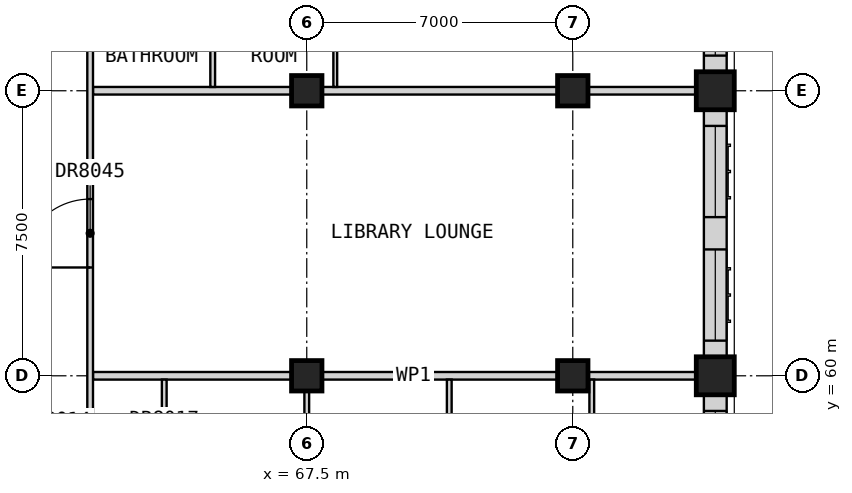
"""IFC4 building model, lengths in metres.
Left out: names, types, materials, properties, quantities, classifications, styles, units other than length and angle.
Written with IfcOpenShell. Run it as: python <this file> out.ifc"""

import sys

from ifc_helpers import new_model, si_unit, direction, frame, frame_2d, origin, origin_2d, place, context, subcontext, project, spatial, rectangle, extrude, element, fill, save


model = new_model("IFC4")
c1 = context("Model", 3, precision=1e-05, world=origin(), true_north=direction((0.0, 1.0)))
c2 = subcontext(c1, "Body", "Model", "MODEL_VIEW")
j1 = project(units=[si_unit("LENGTHUNIT", "METRE"), si_unit("PLANEANGLEUNIT", "RADIAN")], contexts=[c1])
p1 = place(None, origin())
s1 = spatial("IfcSite", under=j1, at=p1, CompositionType="ELEMENT")
p2 = place(p1, origin())
s2 = spatial("IfcBuilding", under=s1, at=p2, CompositionType="ELEMENT")
p3 = place(p2, frame((0.0, 0.0, 233.7)))
s3 = spatial("IfcBuildingStorey", under=s2, at=p3, CompositionType="ELEMENT", Elevation=233.7)
for number, where, z_axis, x_axis in (
    (1, (78.25, 60.0, 0.0), (0.0, 0.0, 1.0), (1.0, 0.0, 0.0)),
    (2, (78.25, 67.5, 0.0), (0.0, 0.0, 1.0), (1.0, 0.0, 0.0)),
):
    element("IfcColumn", number, at=place(p3, frame(where, z_axis=z_axis, x_axis=x_axis)), inside=s3, PredefinedType="COLUMN", context=c2, shape_type="SweptSolid", body=[
        extrude(rectangle(XDim=1.0, YDim=1.0, at=origin_2d()), origin(), (0.0, 0.0, 1.0), 3.5),
    ])
for number, where, z_axis, x_axis in (
    (3, (67.5, 60.0, 0.0), (0.0, 0.0, 1.0), (1.0, 0.0, 0.0)),
    (4, (67.5, 67.5, 0.0), (0.0, 0.0, 1.0), (1.0, 0.0, 0.0)),
    (5, (74.5, 60.0, 0.0), (0.0, 0.0, 1.0), (1.0, 0.0, 0.0)),
    (6, (74.5, 67.5, 0.0), (0.0, 0.0, 1.0), (1.0, 0.0, 0.0)),
):
    element("IfcColumn", number, at=place(p3, frame(where, z_axis=z_axis, x_axis=x_axis)), inside=s3, PredefinedType="COLUMN", context=c2, shape_type="SweptSolid", body=[
        extrude(rectangle(XDim=0.8, YDim=0.8, at=origin_2d()), origin(), (0.0, 0.0, 1.0), 3.5),
    ])
p4 = place(p3, frame((78.25, 53.0, 0.0), z_axis=(0.0, 0.0, 1.0), x_axis=(0.0, 1.0, 0.0)))
e7 = element("IfcWall", 7, at=p4, inside=s3, PredefinedType="SOLIDWALL", context=c2, shape_type="SweptSolid", body=[
    extrude(rectangle(XDim=6.5, YDim=0.6, at=frame_2d((3.25, 0.0))), origin(), (0.0, 0.0, 1.0), 2.75),
])
p5 = place(p4, frame((0.425, 0.0, 0.8)))
e8 = element("IfcOpeningElement", 8, at=p5, cuts=e7, PredefinedType="OPENING", context=c2, shape_type="SweptSolid", body=[
    extrude(rectangle(XDim=2.4, YDim=1.8, at=frame_2d((1.2, 0.9))), frame((0.0, 0.31, 0.0), z_axis=(0.0, -1.0, 0.0), x_axis=(1.0, 0.0, 0.0)), (0.0, 0.0, 1.0), 0.62),
])
p6 = place(p4, frame((3.675, 0.0, 0.8)))
e9 = element("IfcOpeningElement", 9, at=p6, cuts=e7, PredefinedType="OPENING", context=c2, shape_type="SweptSolid", body=[
    extrude(rectangle(XDim=2.4, YDim=1.8, at=frame_2d((1.2, 0.9))), frame((0.0, 0.31, 0.0), z_axis=(0.0, -1.0, 0.0), x_axis=(1.0, 0.0, 0.0)), (0.0, 0.0, 1.0), 0.62),
])
p7 = place(p3, frame((78.25, 60.5, 0.0), z_axis=(0.0, 0.0, 1.0), x_axis=(0.0, 1.0, 0.0)))
e10 = element("IfcWall", 10, at=p7, inside=s3, PredefinedType="SOLIDWALL", context=c2, shape_type="SweptSolid", body=[
    extrude(rectangle(XDim=6.5, YDim=0.6, at=frame_2d((3.25, 0.0))), origin(), (0.0, 0.0, 1.0), 2.75),
])
p8 = place(p7, frame((0.425, 0.0, 0.8)))
e11 = element("IfcOpeningElement", 11, at=p8, cuts=e10, PredefinedType="OPENING", context=c2, shape_type="SweptSolid", body=[
    extrude(rectangle(XDim=2.4, YDim=1.8, at=frame_2d((1.2, 0.9))), frame((0.0, 0.31, 0.0), z_axis=(0.0, -1.0, 0.0), x_axis=(1.0, 0.0, 0.0)), (0.0, 0.0, 1.0), 0.62),
])
p9 = place(p7, frame((3.675, 0.0, 0.8)))
e12 = element("IfcOpeningElement", 12, at=p9, cuts=e10, PredefinedType="OPENING", context=c2, shape_type="SweptSolid", body=[
    extrude(rectangle(XDim=2.4, YDim=1.8, at=frame_2d((1.2, 0.9))), frame((0.0, 0.31, 0.0), z_axis=(0.0, -1.0, 0.0), x_axis=(1.0, 0.0, 0.0)), (0.0, 0.0, 1.0), 0.62),
])
p10 = place(p3, frame((78.25, 68.0, 0.0), z_axis=(0.0, 0.0, 1.0), x_axis=(0.0, 1.0, 0.0)))
e13 = element("IfcWall", 13, at=p10, inside=s3, PredefinedType="SOLIDWALL", context=c2, shape_type="SweptSolid", body=[
    extrude(rectangle(XDim=6.5, YDim=0.6, at=frame_2d((3.25, 0.0))), origin(), (0.0, 0.0, 1.0), 2.75),
])
p11 = place(p10, frame((0.425, 0.0, 0.8)))
e14 = element("IfcOpeningElement", 14, at=p11, cuts=e13, PredefinedType="OPENING", context=c2, shape_type="SweptSolid", body=[
    extrude(rectangle(XDim=2.4, YDim=1.8, at=frame_2d((1.2, 0.9))), frame((0.0, 0.31, 0.0), z_axis=(0.0, -1.0, 0.0), x_axis=(1.0, 0.0, 0.0)), (0.0, 0.0, 1.0), 0.62),
])
p12 = place(p10, frame((3.675, 0.0, 0.8)))
e15 = element("IfcOpeningElement", 15, at=p12, cuts=e13, PredefinedType="OPENING", context=c2, shape_type="SweptSolid", body=[
    extrude(rectangle(XDim=2.4, YDim=1.8, at=frame_2d((1.2, 0.9))), frame((0.0, 0.31, 0.0), z_axis=(0.0, -1.0, 0.0), x_axis=(1.0, 0.0, 0.0)), (0.0, 0.0, 1.0), 0.62),
])
for number, where, z_axis, x_axis in (
    (16, (61.875, 60.0, 0.0), (0.0, 0.0, 1.0), (1.0, 0.0, 0.0)),
    (17, (61.875, 67.5, 0.0), (0.0, 0.0, 1.0), (1.0, 0.0, 0.0)),
):
    element("IfcWall", number, at=place(p3, frame(where, z_axis=z_axis, x_axis=x_axis)), inside=s3, PredefinedType="PARTITIONING", context=c2, shape_type="SweptSolid", body=[
        extrude(rectangle(XDim=16.875, YDim=0.2, at=frame_2d((8.438, 0.0))), origin(), (0.0, 0.0, 1.0), 3.25),
    ])
p13 = place(p3, frame((61.8, 58.275, 0.0), z_axis=(0.0, 0.0, 1.0), x_axis=(0.0, 1.0, 0.0)))
e18 = element("IfcWall", 18, at=p13, inside=s3, PredefinedType="PARTITIONING", context=c2, shape_type="SweptSolid", body=[
    extrude(rectangle(XDim=25.95, YDim=0.15, at=frame_2d((12.975, 0.0))), origin(), (0.0, 0.0, 1.0), 3.25),
])
p14 = place(p13, frame((4.575, 0.0, 0.0)))
e19 = element("IfcOpeningElement", 19, at=p14, cuts=e18, PredefinedType="OPENING", context=c2, shape_type="SweptSolid", body=[
    extrude(rectangle(XDim=1.8, YDim=2.1, at=frame_2d((0.9, 1.05))), frame((0.0, 0.085, 0.0), z_axis=(0.0, -1.0, 0.0), x_axis=(1.0, 0.0, 0.0)), (0.0, 0.0, 1.0), 0.17),
])
p15 = place(p13, frame((14.4, 0.0, 0.0)))
e20 = element("IfcOpeningElement", 20, at=p15, cuts=e18, PredefinedType="OPENING", context=c2, shape_type="SweptSolid", body=[
    extrude(rectangle(XDim=0.9, YDim=2.1, at=frame_2d((0.45, 1.05))), frame((0.0, 0.085, 0.0), z_axis=(0.0, -1.0, 0.0), x_axis=(1.0, 0.0, 0.0)), (0.0, 0.0, 1.0), 0.17),
])
p16 = place(p3, frame((68.25, 67.6, 0.0), z_axis=(0.0, 0.0, 1.0), x_axis=(0.0, 1.0, 0.0)))
e21 = element("IfcWall", 21, at=p16, inside=s3, PredefinedType="PARTITIONING", context=c2, shape_type="SweptSolid", body=[
    extrude(rectangle(XDim=14.8, YDim=0.1, at=frame_2d((7.4, 0.0))), origin(), (0.0, 0.0, 1.0), 3.25),
])
p17 = place(p16, frame((1.325, 0.0, 0.0)))
e22 = element("IfcOpeningElement", 22, at=p17, cuts=e21, PredefinedType="OPENING", context=c2, shape_type="SweptSolid", body=[
    extrude(rectangle(XDim=0.9, YDim=2.1, at=frame_2d((0.45, 1.05))), frame((0.0, 0.06, 0.0), z_axis=(0.0, -1.0, 0.0), x_axis=(1.0, 0.0, 0.0)), (0.0, 0.0, 1.0), 0.12),
])
p18 = place(p16, frame((5.075, 0.0, 0.0)))
e23 = element("IfcOpeningElement", 23, at=p18, cuts=e21, PredefinedType="OPENING", context=c2, shape_type="SweptSolid", body=[
    extrude(rectangle(XDim=0.9, YDim=2.1, at=frame_2d((0.45, 1.05))), frame((0.0, 0.06, 0.0), z_axis=(0.0, -1.0, 0.0), x_axis=(1.0, 0.0, 0.0)), (0.0, 0.0, 1.0), 0.12),
])
p19 = place(p16, frame((12.575, 0.0, 0.0)))
e24 = element("IfcOpeningElement", 24, at=p19, cuts=e21, PredefinedType="OPENING", context=c2, shape_type="SweptSolid", body=[
    extrude(rectangle(XDim=0.9, YDim=2.1, at=frame_2d((0.45, 1.05))), frame((0.0, 0.06, 0.0), z_axis=(0.0, -1.0, 0.0), x_axis=(1.0, 0.0, 0.0)), (0.0, 0.0, 1.0), 0.12),
])
p20 = place(p3, frame((63.75, 54.538, 0.0), z_axis=(0.0, 0.0, 1.0), x_axis=(0.0, 1.0, 0.0)))
e25 = element("IfcWall", 25, at=p20, inside=s3, PredefinedType="PARTITIONING", context=c2, shape_type="SweptSolid", body=[
    extrude(rectangle(XDim=5.362, YDim=0.125, at=frame_2d((2.681, 0.0))), origin(), (0.0, 0.0, 1.0), 3.25),
])
p21 = place(p20, frame((2.25, 0.0, 0.0)))
e26 = element("IfcOpeningElement", 26, at=p21, cuts=e25, PredefinedType="OPENING", context=c2, shape_type="SweptSolid", body=[
    extrude(rectangle(XDim=0.9, YDim=2.1, at=frame_2d((0.45, 1.05))), frame((0.0, 0.073, 0.0), z_axis=(0.0, -1.0, 0.0), x_axis=(1.0, 0.0, 0.0)), (0.0, 0.0, 1.0), 0.145),
])
p22 = place(p3, frame((65.025, 67.6, 0.0), z_axis=(0.0, 0.0, 1.0), x_axis=(0.0, 1.0, 0.0)))
e27 = element("IfcWall", 27, at=p22, inside=s3, PredefinedType="PARTITIONING", context=c2, shape_type="SweptSolid", body=[
    extrude(rectangle(XDim=3.587, YDim=0.125, at=frame_2d((1.794, 0.0))), origin(), (0.0, 0.0, 1.0), 3.25),
])
p23 = place(p22, frame((1.325, 0.0, 0.0)))
e28 = element("IfcOpeningElement", 28, at=p23, cuts=e27, PredefinedType="OPENING", context=c2, shape_type="SweptSolid", body=[
    extrude(rectangle(XDim=0.9, YDim=2.1, at=frame_2d((0.45, 1.05))), frame((0.0, 0.073, 0.0), z_axis=(0.0, -1.0, 0.0), x_axis=(1.0, 0.0, 0.0)), (0.0, 0.0, 1.0), 0.145),
])
for number, where, z_axis, x_axis in (
    (29, (67.5, 54.538, 0.0), (0.0, 0.0, 1.0), (0.0, 1.0, 0.0)),
    (30, (71.25, 54.538, 0.0), (0.0, 0.0, 1.0), (0.0, 1.0, 0.0)),
    (31, (75.0, 54.538, 0.0), (0.0, 0.0, 1.0), (0.0, 1.0, 0.0)),
):
    element("IfcWall", number, at=place(p3, frame(where, z_axis=z_axis, x_axis=x_axis)), inside=s3, PredefinedType="PARTITIONING", context=c2, shape_type="SweptSolid", body=[
        extrude(rectangle(XDim=5.362, YDim=0.125, at=frame_2d((2.681, 0.0))), origin(), (0.0, 0.0, 1.0), 3.25),
    ])
p24 = place(p6, origin())
e32 = element("IfcWindow", 32, at=p24, inside=s3, PartitioningType="SINGLE_PANEL", PredefinedType="WINDOW", context=c2, shape_type="SweptSolid", body=[
    extrude(rectangle(XDim=2.4, YDim=1.8, at=frame_2d((1.2, 0.9))), frame((0.0, -0.07, 0.0), z_axis=(0.0, -1.0, 0.0), x_axis=(1.0, 0.0, 0.0)), (0.0, 0.0, 1.0), 0.06),
])
fill(e9, e32)
p25 = place(p8, origin())
e33 = element("IfcWindow", 33, at=p25, inside=s3, PartitioningType="SINGLE_PANEL", PredefinedType="WINDOW", context=c2, shape_type="SweptSolid", body=[
    extrude(rectangle(XDim=2.4, YDim=1.8, at=frame_2d((1.2, 0.9))), frame((0.0, -0.07, 0.0), z_axis=(0.0, -1.0, 0.0), x_axis=(1.0, 0.0, 0.0)), (0.0, 0.0, 1.0), 0.06),
])
fill(e11, e33)
p26 = place(p9, origin())
e34 = element("IfcWindow", 34, at=p26, inside=s3, PartitioningType="SINGLE_PANEL", PredefinedType="WINDOW", context=c2, shape_type="SweptSolid", body=[
    extrude(rectangle(XDim=2.4, YDim=1.8, at=frame_2d((1.2, 0.9))), frame((0.0, -0.07, 0.0), z_axis=(0.0, -1.0, 0.0), x_axis=(1.0, 0.0, 0.0)), (0.0, 0.0, 1.0), 0.06),
])
fill(e12, e34)
p27 = place(p11, origin())
e35 = element("IfcWindow", 35, at=p27, inside=s3, PartitioningType="SINGLE_PANEL", PredefinedType="WINDOW", context=c2, shape_type="SweptSolid", body=[
    extrude(rectangle(XDim=2.4, YDim=1.8, at=frame_2d((1.2, 0.9))), frame((0.0, -0.07, 0.0), z_axis=(0.0, -1.0, 0.0), x_axis=(1.0, 0.0, 0.0)), (0.0, 0.0, 1.0), 0.06),
])
fill(e14, e35)
p28 = place(p14, origin())
e36 = element("IfcDoor", 36, at=p28, inside=s3, OperationType="DOUBLE_DOOR_SINGLE_SWING", PredefinedType="DOOR", context=c2, shape_type="SweptSolid", body=[
    extrude(rectangle(XDim=1.8, YDim=2.1, at=frame_2d((0.9, 1.05))), frame((0.0, 0.025, 0.0), z_axis=(0.0, -1.0, 0.0), x_axis=(1.0, 0.0, 0.0)), (0.0, 0.0, 1.0), 0.05),
])
fill(e19, e36)
save(model, sys.argv[1])
